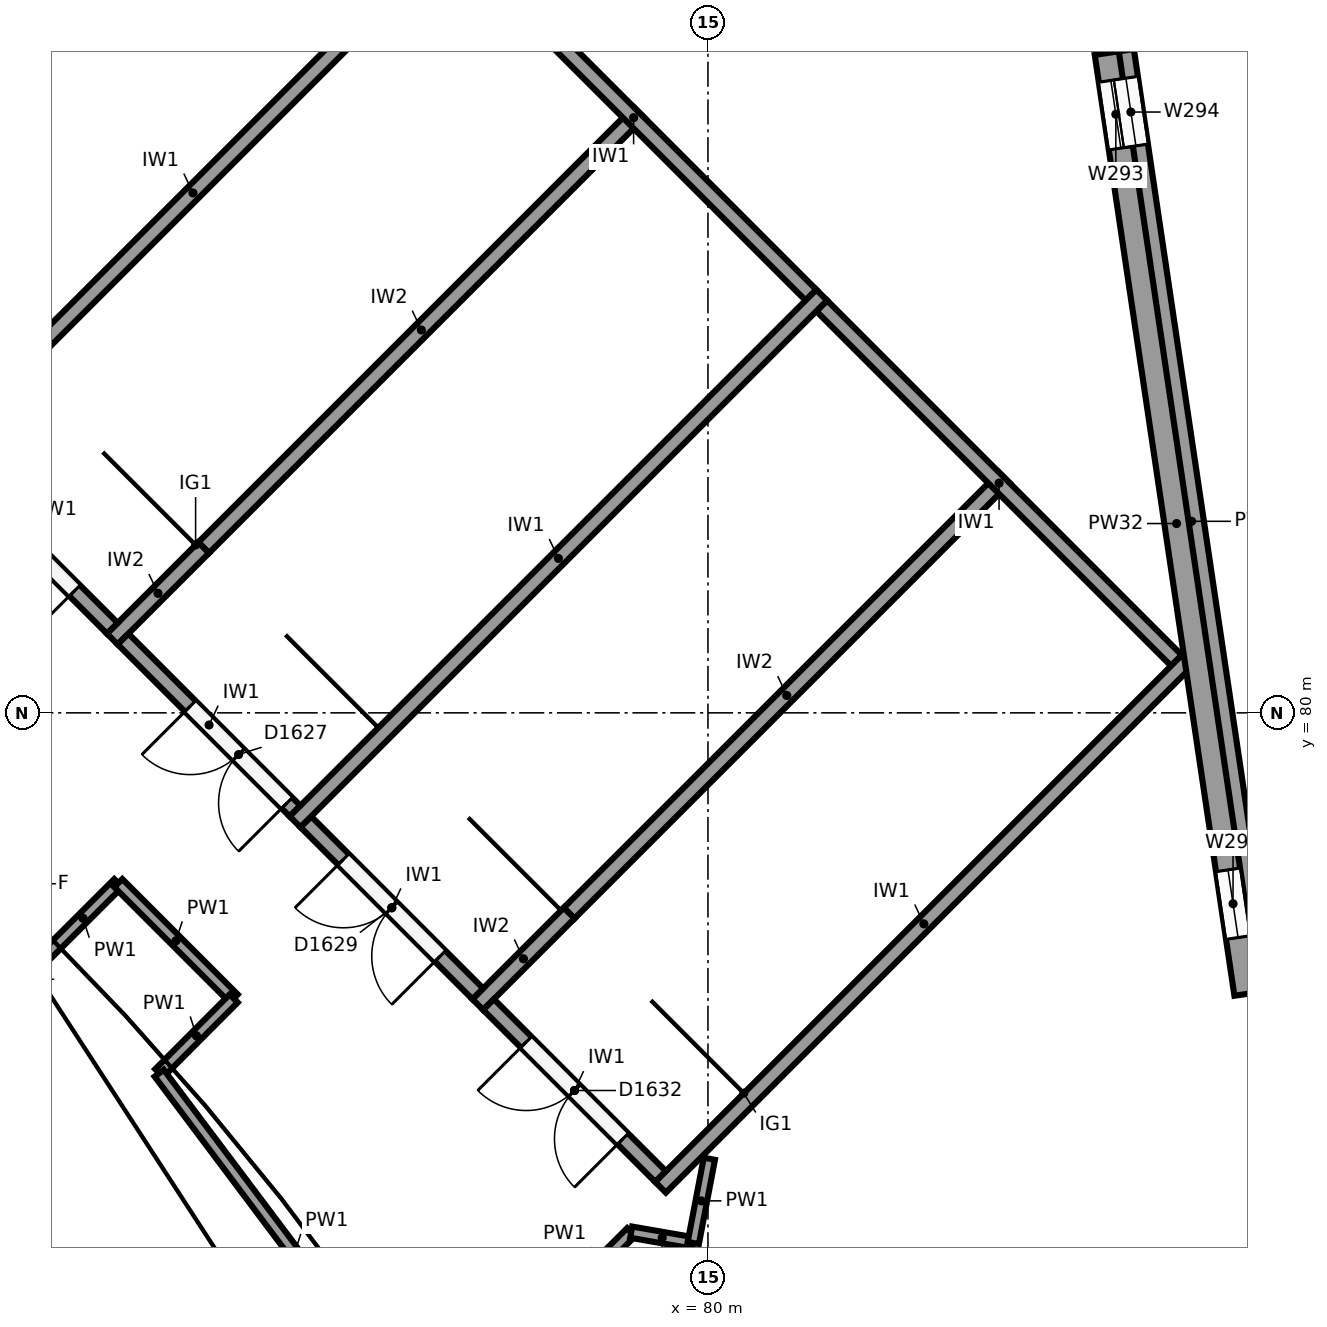
"""IFC4 building model, lengths in metres.
Left out: names, types, materials, properties, quantities, classifications, styles, units other than length and angle.
Written with IfcOpenShell. Run it as: python <this file> out.ifc"""

import sys

from ifc_helpers import new_model, si_unit, direction, frame, frame_2d, origin, origin_2d, place, context, subcontext, project, spatial, polyline, rectangle, circle, outline, extrude, element, fill, save


model = new_model("IFC4")
c1 = context("Model", 3, precision=1e-05, world=origin(), true_north=direction((0.0, 1.0)))
c2 = subcontext(c1, "Body", "Model", "MODEL_VIEW")
j1 = project(units=[si_unit("LENGTHUNIT", "METRE"), si_unit("PLANEANGLEUNIT", "RADIAN")], contexts=[c1])
p1 = place(None, origin())
s1 = spatial("IfcSite", under=j1, at=p1, CompositionType="ELEMENT")
p2 = place(p1, origin())
s2 = spatial("IfcBuilding", under=s1, at=p2, CompositionType="ELEMENT")
p3 = place(p2, frame((0.0, 0.0, 24.0)))
s3 = spatial("IfcBuildingStorey", under=s2, at=p3, CompositionType="ELEMENT", Elevation=24.0)
p4 = place(p3, frame((87.151, 75.857, 0.0), z_axis=(0.0, 0.0, 1.0), x_axis=(1.0, 0.0, 0.0)))
e1 = element("IfcColumn", 1, at=p4, inside=s3, PredefinedType="COLUMN", context=c2, shape_type="SweptSolid", body=[
    extrude(circle(Radius=0.45, at=origin_2d()), origin(), (0.0, 0.0, 1.0), 6.0),
])
p5 = place(p3, frame((71.775, 79.889, 0.0), z_axis=(0.0, 0.0, 1.0), x_axis=(1.0, 0.0, 0.0)))
e2 = element("IfcColumn", 2, at=p5, inside=s3, PredefinedType="COLUMN", context=c2, shape_type="SweptSolid", body=[
    extrude(circle(Radius=0.6, at=origin_2d()), origin(), (0.0, 0.0, 1.0), 6.0),
])
p6 = place(p3, frame((85.174, 89.174, 0.0), z_axis=(0.0, 0.0, 1.0), x_axis=(1.0, 0.0, 0.0)))
e3 = element("IfcColumn", 3, at=p6, inside=s3, PredefinedType="COLUMN", context=c2, shape_type="SweptSolid", body=[
    extrude(circle(Radius=0.5, at=origin_2d()), origin(), (0.0, 0.0, 1.0), 6.0),
])
p7 = place(p3, frame((85.247, 88.68, 0.0), z_axis=(0.0, 0.0, 1.0), x_axis=(0.14684632149, -0.989159318747, 0.0)))
e4 = element("IfcWall", 4, at=p7, inside=s3, PredefinedType="SOLIDWALL", context=c2, shape_type="SweptSolid", body=[
    extrude(rectangle(XDim=12.514, YDim=0.32, at=frame_2d((6.257, 0.0))), origin(), (0.0, 0.0, 1.0), 6.0),
])
p8 = place(p7, frame((10.864, 0.0, 1.0)))
e5 = element("IfcOpeningElement", 5, at=p8, cuts=e4, PredefinedType="OPENING", context=c2, shape_type="SweptSolid", body=[
    extrude(rectangle(XDim=0.9, YDim=3.25, at=frame_2d((0.45, 1.625))), frame((0.0, 0.17, 0.0), z_axis=(0.0, -1.0, 0.0), x_axis=(1.0, 0.0, 0.0)), (0.0, 0.0, 1.0), 0.34),
])
p9 = place(p7, frame((0.364, 0.0, 1.0)))
e6 = element("IfcOpeningElement", 6, at=p9, cuts=e4, PredefinedType="OPENING", context=c2, shape_type="SweptSolid", body=[
    extrude(rectangle(XDim=0.9, YDim=3.25, at=frame_2d((0.45, 1.625))), frame((0.0, 0.17, 0.0), z_axis=(0.0, -1.0, 0.0), x_axis=(1.0, 0.0, 0.0)), (0.0, 0.0, 1.0), 0.34),
])
p10 = place(p3, frame((85.445, 88.709, 6.0), z_axis=(0.0, 0.0, 1.0), x_axis=(0.146868244204, -0.989156063948, 0.0)))
e7 = element("IfcWall", 7, at=p10, inside=s3, PredefinedType="SOLIDWALL", context=c2, shape_type="SweptSolid", body=[
    extrude(outline(polyline([(0.0, 0.0), (12.514, 0.0), (12.514, 4.117), (0.0, 10.438), (0.0, 0.0)])), frame((0.0, 0.16, 0.0), z_axis=(0.0, -1.0, 0.0), x_axis=(1.0, 0.0, 0.0)), (0.0, 0.0, 1.0), 0.32),
])
p11 = place(p10, frame((0.364, 0.0, 1.6)))
e8 = element("IfcOpeningElement", 8, at=p11, cuts=e7, PredefinedType="OPENING", context=c2, shape_type="SweptSolid", body=[
    extrude(rectangle(XDim=0.9, YDim=3.0, at=frame_2d((0.45, 1.5))), frame((0.0, 0.17, 0.0), z_axis=(0.0, -1.0, 0.0), x_axis=(1.0, 0.0, 0.0)), (0.0, 0.0, 1.0), 0.34),
])
p12 = place(p3, frame((91.137, 72.998, 0.0), z_axis=(0.0, 0.0, 1.0), x_axis=(-0.943887243331, -0.330267878966, 0.0)))
e9 = element("IfcWall", 9, at=p12, inside=s3, PredefinedType="SHEAR", context=c2, shape_type="SweptSolid", body=[
    extrude(rectangle(XDim=8.3, YDim=0.2, at=frame_2d((4.15, 0.0))), origin(), (0.0, 0.0, 1.0), 5.75),
])
for number, where, z_axis, x_axis in (
    (10, (86.305, 80.688, 0.0), (0.0, 0.0, 1.0), (-0.707, -0.707, 0.0)),
    (11, (81.497, 85.497, 0.0), (0.0, 0.0, 1.0), (-0.707, -0.707, 0.0)),
    (12, (76.688, 90.305, 0.0), (0.0, 0.0, 1.0), (-0.707, -0.707, 0.0)),
):
    element("IfcWall", number, at=place(p3, frame(where, z_axis=z_axis, x_axis=x_axis)), inside=s3, PredefinedType="SHEAR", context=c2, shape_type="SweptSolid", body=[
        extrude(rectangle(XDim=9.8, YDim=0.2, at=frame_2d((4.9, 0.0))), origin(), (0.0, 0.0, 1.0), 5.75),
    ])
for number, where, z_axis, x_axis in (
    (13, (86.164, 80.688, 0.0), (0.0, 0.0, 1.0), (-0.707, 0.707, 0.0)),
    (14, (81.355, 85.497, 0.0), (0.0, 0.0, 1.0), (-0.707, 0.707, 0.0)),
):
    element("IfcWall", number, at=place(p3, frame(where, z_axis=z_axis, x_axis=x_axis)), inside=s3, PredefinedType="SHEAR", context=c2, shape_type="SweptSolid", body=[
        extrude(rectangle(XDim=6.6, YDim=0.2, at=frame_2d((3.3, 0.0))), origin(), (0.0, 0.0, 1.0), 5.75),
    ])
p13 = place(p3, frame((83.901, 83.093, 0.0), z_axis=(0.0, 0.0, 1.0), x_axis=(-0.707106781187, -0.707106781187, 0.0)))
e15 = element("IfcWall", 15, at=p13, inside=s3, PredefinedType="SHEAR", context=c2, shape_type="SweptSolid", body=[
    extrude(rectangle(XDim=8.1, YDim=0.2, at=frame_2d((4.05, 0.0))), origin(), (0.0, 0.0, 1.0), 5.75),
])
p14 = place(p3, frame((78.173, 77.365, 0.0), z_axis=(0.0, 0.0, 1.0), x_axis=(-0.707178586901, -0.707034968179, 0.0)))
e16 = element("IfcWall", 16, at=p14, inside=s3, PredefinedType="SHEAR", context=c2, shape_type="SweptSolid", body=[
    extrude(rectangle(XDim=1.7, YDim=0.2, at=frame_2d((0.85, 0.0))), origin(), (0.0, 0.0, 1.0), 5.75),
])
p15 = place(p3, frame((79.093, 87.901, 0.0), z_axis=(0.0, 0.0, 1.0), x_axis=(-0.707106781187, -0.707106781187, 0.0)))
e17 = element("IfcWall", 17, at=p15, inside=s3, PredefinedType="SHEAR", context=c2, shape_type="SweptSolid", body=[
    extrude(rectangle(XDim=8.1, YDim=0.2, at=frame_2d((4.05, 0.0))), origin(), (0.0, 0.0, 1.0), 5.75),
])
p16 = place(p3, frame((73.365, 82.173, 0.0), z_axis=(0.0, 0.0, 1.0), x_axis=(-0.707034968179, -0.707178586901, 0.0)))
e18 = element("IfcWall", 18, at=p16, inside=s3, PredefinedType="SHEAR", context=c2, shape_type="SweptSolid", body=[
    extrude(rectangle(XDim=1.7, YDim=0.2, at=frame_2d((0.85, 0.0))), origin(), (0.0, 0.0, 1.0), 5.75),
])
p17 = place(p3, frame((79.375, 73.9, 0.0), z_axis=(0.0, 0.0, 1.0), x_axis=(-0.707068634461, 0.707144925854, 0.0)))
e19 = element("IfcWall", 19, at=p17, inside=s3, PredefinedType="SHEAR", context=c2, shape_type="SweptSolid", body=[
    extrude(rectangle(XDim=3.2, YDim=0.2, at=frame_2d((1.6, 0.0))), origin(), (0.0, 0.0, 1.0), 5.75),
])
p18 = place(p17, frame((0.7, 0.0, 0.0)))
e20 = element("IfcOpeningElement", 20, at=p18, cuts=e19, PredefinedType="OPENING", context=c2, shape_type="SweptSolid", body=[
    extrude(rectangle(XDim=1.8, YDim=2.1, at=frame_2d((0.9, 1.05))), frame((0.0, 0.11, 0.0), z_axis=(0.0, -1.0, 0.0), x_axis=(1.0, 0.0, 0.0)), (0.0, 0.0, 1.0), 0.22),
])
p19 = place(p3, frame((76.971, 76.304, 0.0), z_axis=(0.0, 0.0, 1.0), x_axis=(-0.707106781187, 0.707106781187, 0.0)))
e21 = element("IfcWall", 21, at=p19, inside=s3, PredefinedType="SHEAR", context=c2, shape_type="SweptSolid", body=[
    extrude(rectangle(XDim=3.2, YDim=0.2, at=frame_2d((1.6, 0.0))), origin(), (0.0, 0.0, 1.0), 5.75),
])
p20 = place(p19, frame((0.7, 0.0, 0.0)))
e22 = element("IfcOpeningElement", 22, at=p20, cuts=e21, PredefinedType="OPENING", context=c2, shape_type="SweptSolid", body=[
    extrude(rectangle(XDim=1.8, YDim=2.1, at=frame_2d((0.9, 1.05))), frame((0.0, 0.11, 0.0), z_axis=(0.0, -1.0, 0.0), x_axis=(1.0, 0.0, 0.0)), (0.0, 0.0, 1.0), 0.22),
])
p21 = place(p3, frame((74.567, 78.708, 0.0), z_axis=(0.0, 0.0, 1.0), x_axis=(-0.707106781187, 0.707106781187, 0.0)))
e23 = element("IfcWall", 23, at=p21, inside=s3, PredefinedType="SHEAR", context=c2, shape_type="SweptSolid", body=[
    extrude(rectangle(XDim=3.2, YDim=0.2, at=frame_2d((1.6, 0.0))), origin(), (0.0, 0.0, 1.0), 5.75),
])
p22 = place(p21, frame((0.15, 0.0, 0.0)))
e24 = element("IfcOpeningElement", 24, at=p22, cuts=e23, PredefinedType="OPENING", context=c2, shape_type="SweptSolid", body=[
    extrude(rectangle(XDim=1.8, YDim=2.1, at=frame_2d((0.9, 1.05))), frame((0.0, 0.11, 0.0), z_axis=(0.0, -1.0, 0.0), x_axis=(1.0, 0.0, 0.0)), (0.0, 0.0, 1.0), 0.22),
])
p23 = place(p3, frame((72.163, 81.113, 0.0), z_axis=(0.0, 0.0, 1.0), x_axis=(-0.707144925854, 0.707068634461, 0.0)))
e25 = element("IfcWall", 25, at=p23, inside=s3, PredefinedType="SHEAR", context=c2, shape_type="SweptSolid", body=[
    extrude(rectangle(XDim=3.2, YDim=0.2, at=frame_2d((1.6, 0.0))), origin(), (0.0, 0.0, 1.0), 5.75),
])
p24 = place(p23, frame((0.7, 0.0, 0.0)))
e26 = element("IfcOpeningElement", 26, at=p24, cuts=e25, PredefinedType="OPENING", context=c2, shape_type="SweptSolid", body=[
    extrude(rectangle(XDim=1.8, YDim=2.1, at=frame_2d((0.9, 1.05))), frame((0.0, 0.11, 0.0), z_axis=(0.0, -1.0, 0.0), x_axis=(1.0, 0.0, 0.0)), (0.0, 0.0, 1.0), 0.22),
])
p25 = place(p3, frame((71.313, 76.834, 0.0), z_axis=(0.0, 0.0, 1.0), x_axis=(0.707664949678, 0.706548171746, 0.0)))
e27 = element("IfcWall", 27, at=p25, inside=s3, PredefinedType="PARTITIONING", context=c2, shape_type="SweptSolid", body=[
    extrude(rectangle(XDim=1.312, YDim=0.15, at=frame_2d((0.656, 0.0))), origin(), (0.0, 0.0, 1.0), 5.4),
])
p26 = place(p3, frame((72.242, 77.76, 0.0), z_axis=(0.0, 0.0, 1.0), x_axis=(0.707163624852, -0.707049932951, 0.0)))
e28 = element("IfcWall", 28, at=p26, inside=s3, PredefinedType="PARTITIONING", context=c2, shape_type="SweptSolid", body=[
    extrude(rectangle(XDim=2.147, YDim=0.15, at=frame_2d((1.074, 0.0))), origin(), (0.0, 0.0, 1.0), 5.4),
])
p27 = place(p3, frame((73.76, 76.242, 0.0), z_axis=(0.0, 0.0, 1.0), x_axis=(-0.706226529773, -0.707985938168, 0.0)))
e29 = element("IfcWall", 29, at=p27, inside=s3, PredefinedType="PARTITIONING", context=c2, shape_type="SweptSolid", body=[
    extrude(rectangle(XDim=1.388, YDim=0.15, at=frame_2d((0.694, 0.0))), origin(), (0.0, 0.0, 1.0), 5.4),
])
p28 = place(p3, frame((72.78, 75.26, 0.0), z_axis=(0.0, 0.0, 1.0), x_axis=(0.600540118693, -0.799594625945, 0.0)))
e30 = element("IfcWall", 30, at=p28, inside=s3, PredefinedType="PARTITIONING", context=c2, shape_type="SweptSolid", body=[
    extrude(rectangle(XDim=5.929, YDim=0.15, at=frame_2d((2.964, 0.0))), origin(), (0.0, 0.0, 1.0), 5.4),
])
p29 = place(p3, frame((78.091, 72.269, 0.0), z_axis=(0.0, 0.0, 1.0), x_axis=(0.707106781187, 0.707106781187, 0.0)))
e31 = element("IfcWall", 31, at=p29, inside=s3, PredefinedType="PARTITIONING", context=c2, shape_type="SweptSolid", body=[
    extrude(rectangle(XDim=1.272, YDim=0.15, at=frame_2d((0.636, 0.0))), origin(), (0.0, 0.0, 1.0), 5.4),
])
p30 = place(p3, frame((78.99, 73.168, 0.0), z_axis=(0.0, 0.0, 1.0), x_axis=(0.985216075357, -0.171316329805, 0.0)))
e32 = element("IfcWall", 32, at=p30, inside=s3, PredefinedType="PARTITIONING", context=c2, shape_type="SweptSolid", body=[
    extrude(rectangle(XDim=0.829, YDim=0.15, at=frame_2d((0.415, 0.0))), origin(), (0.0, 0.0, 1.0), 5.4),
])
p31 = place(p3, frame((79.807, 73.026, 0.0), z_axis=(0.0, 0.0, 1.0), x_axis=(0.187490142289, 0.982266484486, 0.0)))
e33 = element("IfcWall", 33, at=p31, inside=s3, PredefinedType="PARTITIONING", context=c2, shape_type="SweptSolid", body=[
    extrude(rectangle(XDim=1.128, YDim=0.15, at=frame_2d((0.564, 0.0))), origin(), (0.0, 0.0, 1.0), 5.4),
])
p32 = place(p8, origin())
e34 = element("IfcWindow", 34, at=p32, inside=s3, PartitioningType="SINGLE_PANEL", PredefinedType="WINDOW", context=c2, shape_type="SweptSolid", body=[
    extrude(rectangle(XDim=0.9, YDim=3.25, at=frame_2d((0.45, 1.625))), frame((0.0, 0.03, 0.0), z_axis=(0.0, -1.0, 0.0), x_axis=(1.0, 0.0, 0.0)), (0.0, 0.0, 1.0), 0.06),
])
fill(e5, e34)
p33 = place(p9, origin())
e35 = element("IfcWindow", 35, at=p33, inside=s3, PartitioningType="SINGLE_PANEL", PredefinedType="WINDOW", context=c2, shape_type="SweptSolid", body=[
    extrude(rectangle(XDim=0.9, YDim=3.25, at=frame_2d((0.45, 1.625))), frame((0.0, 0.03, 0.0), z_axis=(0.0, -1.0, 0.0), x_axis=(1.0, 0.0, 0.0)), (0.0, 0.0, 1.0), 0.06),
])
fill(e6, e35)
p34 = place(p11, origin())
e36 = element("IfcWindow", 36, at=p34, inside=s3, PartitioningType="SINGLE_PANEL", PredefinedType="WINDOW", context=c2, shape_type="SweptSolid", body=[
    extrude(rectangle(XDim=0.9, YDim=3.0, at=frame_2d((0.45, 1.5))), frame((0.0, 0.03, 0.0), z_axis=(0.0, -1.0, 0.0), x_axis=(1.0, 0.0, 0.0)), (0.0, 0.0, 1.0), 0.06),
])
fill(e8, e36)
p35 = place(p18, origin())
e37 = element("IfcDoor", 37, at=p35, inside=s3, OperationType="DOUBLE_DOOR_SINGLE_SWING", PredefinedType="DOOR", context=c2, shape_type="SweptSolid", body=[
    extrude(rectangle(XDim=1.8, YDim=2.1, at=frame_2d((0.9, 1.05))), frame((0.0, 0.025, 0.0), z_axis=(0.0, -1.0, 0.0), x_axis=(1.0, 0.0, 0.0)), (0.0, 0.0, 1.0), 0.05),
])
fill(e20, e37)
p36 = place(p20, origin())
e38 = element("IfcDoor", 38, at=p36, inside=s3, OperationType="DOUBLE_DOOR_SINGLE_SWING", PredefinedType="DOOR", context=c2, shape_type="SweptSolid", body=[
    extrude(rectangle(XDim=1.8, YDim=2.1, at=frame_2d((0.9, 1.05))), frame((0.0, 0.025, 0.0), z_axis=(0.0, -1.0, 0.0), x_axis=(1.0, 0.0, 0.0)), (0.0, 0.0, 1.0), 0.05),
])
fill(e22, e38)
p37 = place(p22, origin())
e39 = element("IfcDoor", 39, at=p37, inside=s3, OperationType="DOUBLE_DOOR_SINGLE_SWING", PredefinedType="DOOR", context=c2, shape_type="SweptSolid", body=[
    extrude(rectangle(XDim=1.8, YDim=2.1, at=frame_2d((0.9, 1.05))), frame((0.0, 0.025, 0.0), z_axis=(0.0, -1.0, 0.0), x_axis=(1.0, 0.0, 0.0)), (0.0, 0.0, 1.0), 0.05),
])
fill(e24, e39)
p38 = place(p24, origin())
e40 = element("IfcDoor", 40, at=p38, inside=s3, OperationType="DOUBLE_DOOR_SINGLE_SWING", PredefinedType="DOOR", context=c2, shape_type="SweptSolid", body=[
    extrude(rectangle(XDim=1.8, YDim=2.1, at=frame_2d((0.9, 1.05))), frame((0.0, 0.025, 0.0), z_axis=(0.0, -1.0, 0.0), x_axis=(1.0, 0.0, 0.0)), (0.0, 0.0, 1.0), 0.05),
])
fill(e26, e40)
save(model, sys.argv[1])
